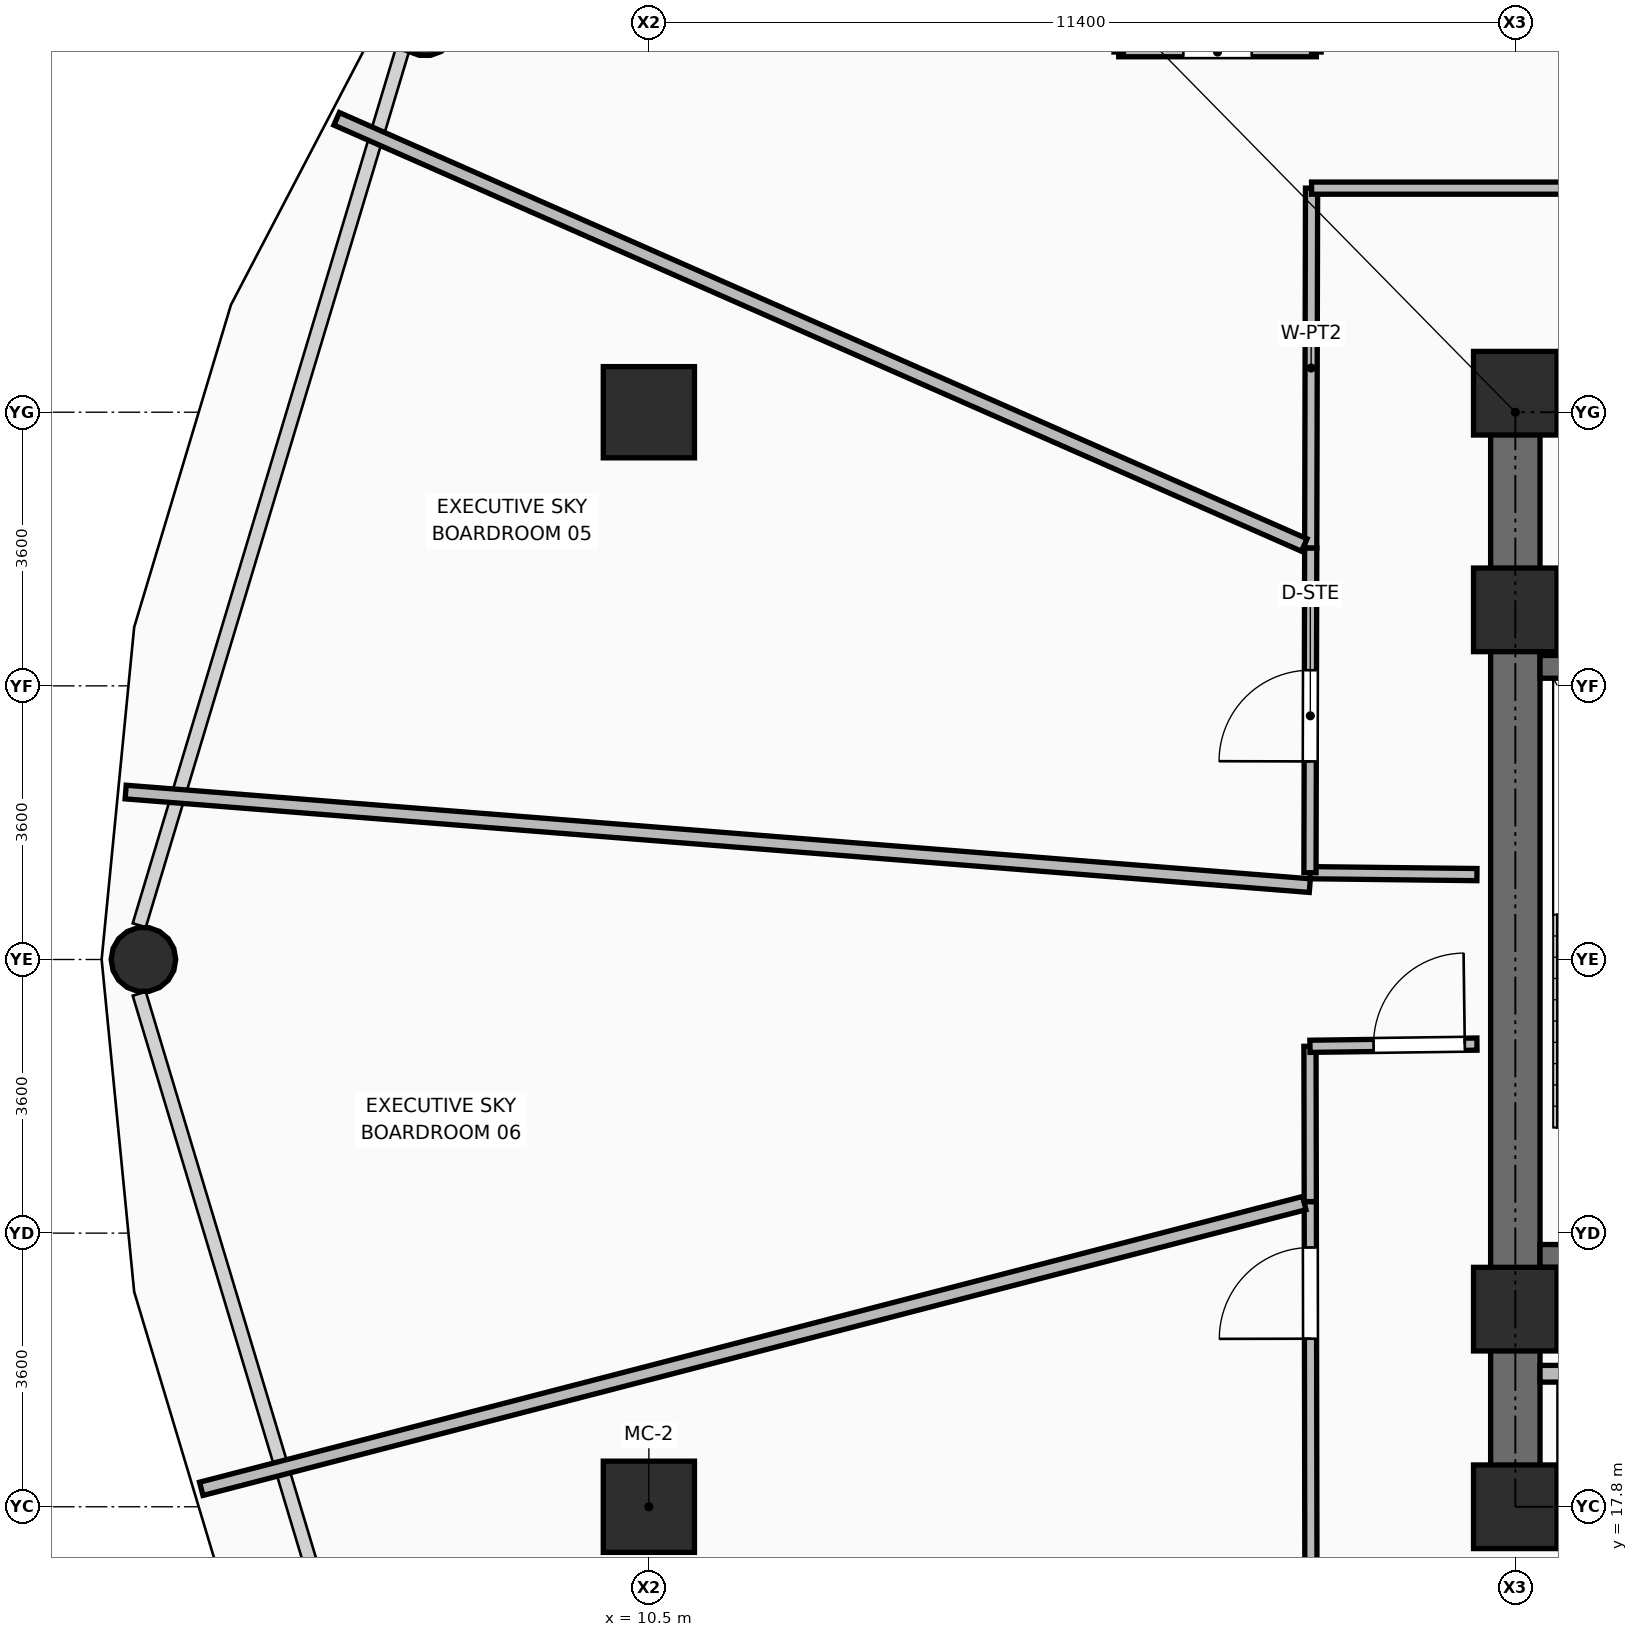
"""IFC4 building model, lengths in metres.
Left out: names, types, materials, properties, quantities, classifications, styles, units other than length and angle.
Written with IfcOpenShell. Run it as: python <this file> out.ifc"""

import sys

from ifc_helpers import new_model, si_unit, direction, frame, frame_2d, origin, origin_2d, place, context, subcontext, project, spatial, rectangle, hollow_rectangle, hollow_circle, extrude, element, fill, save


model = new_model("IFC4")
c1 = context("Model", 3, precision=1e-05, world=origin(), true_north=direction((0.0, 1.0)))
c2 = subcontext(c1, "Body", "Model", "MODEL_VIEW")
j1 = project(units=[si_unit("LENGTHUNIT", "METRE"), si_unit("PLANEANGLEUNIT", "RADIAN")], contexts=[c1])
p1 = place(None, origin())
s1 = spatial("IfcSite", under=j1, at=p1, CompositionType="ELEMENT")
p2 = place(p1, origin())
s2 = spatial("IfcBuilding", under=s1, at=p2, CompositionType="ELEMENT")
p3 = place(p2, frame((0.0, 0.0, 75.75)))
s3 = spatial("IfcBuildingStorey", under=s2, at=p3, CompositionType="ELEMENT", Elevation=75.75)
for number, where, z_axis, x_axis in (
    (1, (21.9, 17.8, 0.0), (0.0, 0.0, 1.0), (1.0, 0.0, 0.0)),
    (2, (21.9, 20.4, 0.0), (0.0, 0.0, 1.0), (1.0, 0.0, 0.0)),
    (3, (21.9, 29.6, 0.0), (0.0, 0.0, 1.0), (1.0, 0.0, 0.0)),
    (4, (21.9, 32.45, 0.0), (0.0, 0.0, 1.0), (1.0, 0.0, 0.0)),
):
    element("IfcColumn", number, at=place(p3, frame(where, z_axis=z_axis, x_axis=x_axis)), inside=s3, PredefinedType="COLUMN", context=c2, shape_type="SweptSolid", body=[
        extrude(rectangle(XDim=1.1, YDim=1.1, at=origin_2d()), origin(), (0.0, 0.0, 1.0), 3.75),
    ])
for number, where, z_axis, x_axis in (
    (5, (10.5, 17.8, 0.0), (0.0, 0.0, 1.0), (1.0, 0.0, 0.0)),
    (6, (10.5, 32.2, 0.0), (0.0, 0.0, 1.0), (1.0, 0.0, 0.0)),
):
    element("IfcColumn", number, at=place(p3, frame(where, z_axis=z_axis, x_axis=x_axis)), inside=s3, PredefinedType="COLUMN", context=c2, shape_type="SweptSolid", body=[
        extrude(hollow_rectangle(XDim=1.2, YDim=1.2, WallThickness=0.045, at=origin_2d()), origin(), (0.0, 0.0, 1.0), 3.75),
    ])
p4 = place(p3, frame((7.554, 37.314, 0.0), z_axis=(0.03641885619, -0.018721888548, 0.999161227132), x_axis=(0.457197196227, 0.889365348865, 0.0)))
e7 = element("IfcColumn", 7, at=p4, inside=s3, PredefinedType="COLUMN", context=c2, shape_type="SweptSolid", body=[
    extrude(hollow_circle(Radius=0.425, WallThickness=0.04, at=origin_2d()), origin(), (0.0, 0.0, 1.0), 3.573),
])
p5 = place(p3, frame((3.85, 25.0, 0.0), z_axis=(0.041951682921, 0.0, 0.999119640634), x_axis=(0.0, 1.0, 0.0)))
e8 = element("IfcColumn", 8, at=p5, inside=s3, PredefinedType="COLUMN", context=c2, shape_type="SweptSolid", body=[
    extrude(hollow_circle(Radius=0.425, WallThickness=0.04, at=origin_2d()), origin(), (0.0, 0.0, 1.0), 3.573),
])
p6 = place(p3, frame((21.575, 17.8, 0.0), z_axis=(0.0, 0.0, 1.0), x_axis=(1.0, 0.0, 0.0)))
e9 = element("IfcWall", 9, at=p6, inside=s3, PredefinedType="SHEAR", context=c2, shape_type="SweptSolid", body=[
    extrude(rectangle(XDim=2.175, YDim=0.65, at=frame_2d((1.087, 0.0))), origin(), (0.0, 0.0, 1.0), 3.57),
])
p7 = place(p3, frame((21.575, 32.45, 0.0), z_axis=(0.0, 0.0, 1.0), x_axis=(1.0, 0.0, 0.0)))
e10 = element("IfcWall", 10, at=p7, inside=s3, PredefinedType="SHEAR", context=c2, shape_type="SweptSolid", body=[
    extrude(rectangle(XDim=19.85, YDim=0.65, at=frame_2d((9.925, 0.0))), origin(), (0.0, 0.0, 1.0), 3.57),
])
p8 = place(p7, frame((2.175, 0.0, 0.0)))
e11 = element("IfcOpeningElement", 11, at=p8, cuts=e10, PredefinedType="OPENING", context=c2, shape_type="SweptSolid", body=[
    extrude(rectangle(XDim=1.1, YDim=2.1, at=frame_2d((0.55, 1.05))), frame((0.0, 0.335, 0.0), z_axis=(0.0, -1.0, 0.0), x_axis=(1.0, 0.0, 0.0)), (0.0, 0.0, 1.0), 0.67),
])
p9 = place(p7, frame((15.565, 0.0, 0.0)))
e12 = element("IfcOpeningElement", 12, at=p9, cuts=e10, PredefinedType="OPENING", context=c2, shape_type="SweptSolid", body=[
    extrude(rectangle(XDim=1.0, YDim=2.1, at=frame_2d((0.5, 1.05))), frame((0.0, 0.335, 0.0), z_axis=(0.0, -1.0, 0.0), x_axis=(1.0, 0.0, 0.0)), (0.0, 0.0, 1.0), 0.67),
])
p10 = place(p7, frame((17.575, 0.0, 0.0)))
e13 = element("IfcOpeningElement", 13, at=p10, cuts=e10, PredefinedType="OPENING", context=c2, shape_type="SweptSolid", body=[
    extrude(rectangle(XDim=0.9, YDim=2.1, at=frame_2d((0.45, 1.05))), frame((0.0, 0.335, 0.0), z_axis=(0.0, -1.0, 0.0), x_axis=(1.0, 0.0, 0.0)), (0.0, 0.0, 1.0), 0.67),
])
p11 = place(p3, frame((21.9, 18.125, 0.0), z_axis=(0.0, 0.0, 1.0), x_axis=(0.0, 1.0, 0.0)))
e14 = element("IfcWall", 14, at=p11, inside=s3, PredefinedType="SHEAR", context=c2, shape_type="SweptSolid", body=[
    extrude(rectangle(XDim=14.0, YDim=0.65, at=frame_2d((7.0, 0.0))), origin(), (0.0, 0.0, 1.0), 3.57),
])
p12 = place(p3, frame((22.225, 21.1, 0.0), z_axis=(0.0, 0.0, 1.0), x_axis=(1.0, 0.0, 0.0)))
e15 = element("IfcWall", 15, at=p12, inside=s3, PredefinedType="SHEAR", context=c2, shape_type="SweptSolid", body=[
    extrude(rectangle(XDim=3.515, YDim=0.3, at=frame_2d((1.757, 0.0))), origin(), (0.0, 0.0, 1.0), 3.57),
])
p13 = place(p12, frame((1.995, 0.0, 0.0)))
e16 = element("IfcOpeningElement", 16, at=p13, cuts=e15, PredefinedType="OPENING", context=c2, shape_type="SweptSolid", body=[
    extrude(rectangle(XDim=1.05, YDim=2.1, at=frame_2d((0.525, 1.05))), frame((0.0, 0.16, 0.0), z_axis=(0.0, -1.0, 0.0), x_axis=(1.0, 0.0, 0.0)), (0.0, 0.0, 1.0), 0.32),
])
p14 = place(p3, frame((22.225, 28.85, 0.0), z_axis=(0.0, 0.0, 1.0), x_axis=(1.0, 0.0, 0.0)))
e17 = element("IfcWall", 17, at=p14, inside=s3, PredefinedType="SHEAR", context=c2, shape_type="SweptSolid", body=[
    extrude(rectangle(XDim=3.515, YDim=0.3, at=frame_2d((1.757, 0.0))), origin(), (0.0, 0.0, 1.0), 3.57),
])
p15 = place(p3, frame((22.225, 19.55, 0.0), z_axis=(0.0, 0.0, 1.0), x_axis=(1.0, 0.0, 0.0)))
e18 = element("IfcWall", 18, at=p15, inside=s3, PredefinedType="PARTITIONING", context=c2, shape_type="SweptSolid", body=[
    extrude(rectangle(XDim=1.565, YDim=0.22, at=frame_2d((0.782, 0.0))), origin(), (0.0, 0.0, 1.0), 2.595),
])
p16 = place(p3, frame((21.395, 26.117, 0.0), z_axis=(0.0, 0.0, 1.0), x_axis=(-0.999934504226, 0.011444966545, 0.0)))
e19 = element("IfcWall", 19, at=p16, inside=s3, PredefinedType="PARTITIONING", context=c2, shape_type="SweptSolid", body=[
    extrude(rectangle(XDim=2.197, YDim=0.16, at=frame_2d((1.099, 0.0))), origin(), (0.0, 0.0, 1.0), 3.55),
])
p17 = place(p3, frame((19.198, 26.142, 0.0), z_axis=(0.0, 0.0, 1.0), x_axis=(0.002342582991, 0.999997256149, 0.0)))
e20 = element("IfcWall", 20, at=p17, inside=s3, PredefinedType="PARTITIONING", context=c2, shape_type="SweptSolid", body=[
    extrude(rectangle(XDim=4.273, YDim=0.16, at=frame_2d((2.136, 0.0))), origin(), (0.0, 0.0, 1.0), 3.55),
])
p18 = place(p17, frame((1.464, 0.0, 0.0)))
e21 = element("IfcOpeningElement", 21, at=p18, cuts=e20, PredefinedType="OPENING", context=c2, shape_type="SweptSolid", body=[
    extrude(rectangle(XDim=1.2, YDim=2.1, at=frame_2d((0.6, 1.05))), frame((0.0, 0.09, 0.0), z_axis=(0.0, -1.0, 0.0), x_axis=(1.0, 0.0, 0.0)), (0.0, 0.0, 1.0), 0.18),
])
p19 = place(p3, frame((19.208, 30.415, 0.0), z_axis=(0.0, 0.0, 1.0), x_axis=(0.002321256513, 0.99999730588, 0.0)))
e22 = element("IfcWall", 22, at=p19, inside=s3, PredefinedType="PARTITIONING", context=c2, shape_type="SweptSolid", body=[
    extrude(rectangle(XDim=4.733, YDim=0.16, at=frame_2d((2.366, 0.0))), origin(), (0.0, 0.0, 1.0), 2.928),
])
p20 = place(p3, frame((19.219, 35.148, 0.0), z_axis=(0.0, 0.0, 1.0), x_axis=(1.0, 0.0, 0.0)))
e23 = element("IfcWall", 23, at=p20, inside=s3, PredefinedType="PARTITIONING", context=c2, shape_type="SweptSolid", body=[
    extrude(rectangle(XDim=7.741, YDim=0.16, at=frame_2d((3.871, 0.0))), origin(), (0.0, 0.0, 1.0), 2.928),
])
p21 = place(p20, frame((4.307, 0.0, 0.0)))
e24 = element("IfcOpeningElement", 24, at=p21, cuts=e23, PredefinedType="OPENING", context=c2, shape_type="SweptSolid", body=[
    extrude(rectangle(XDim=1.2, YDim=2.1, at=frame_2d((0.6, 1.05))), frame((0.0, 0.09, 0.0), z_axis=(0.0, -1.0, 0.0), x_axis=(1.0, 0.0, 0.0)), (0.0, 0.0, 1.0), 0.18),
])
p22 = place(p3, frame((19.219, 11.867, 0.0), z_axis=(0.0, 0.0, 1.0), x_axis=(-0.001717915349, 0.999998524382, 0.0)))
e25 = element("IfcWall", 25, at=p22, inside=s3, PredefinedType="PARTITIONING", context=c2, shape_type="SweptSolid", body=[
    extrude(rectangle(XDim=9.948, YDim=0.16, at=frame_2d((4.974, 0.0))), origin(), (0.0, 0.0, 1.0), 2.928),
])
p23 = place(p22, frame((8.144, 0.0, 0.0)))
e26 = element("IfcOpeningElement", 26, at=p23, cuts=e25, PredefinedType="OPENING", context=c2, shape_type="SweptSolid", body=[
    extrude(rectangle(XDim=1.2, YDim=2.1, at=frame_2d((0.6, 1.05))), frame((0.0, 0.09, 0.0), z_axis=(0.0, -1.0, 0.0), x_axis=(1.0, 0.0, 0.0)), (0.0, 0.0, 1.0), 0.18),
])
p24 = place(p3, frame((19.202, 21.815, 0.0), z_axis=(0.0, 0.0, 1.0), x_axis=(-0.001912042394, 0.999998172045, 0.0)))
e27 = element("IfcWall", 27, at=p24, inside=s3, PredefinedType="PARTITIONING", context=c2, shape_type="SweptSolid", body=[
    extrude(rectangle(XDim=2.043, YDim=0.16, at=frame_2d((1.021, 0.0))), origin(), (0.0, 0.0, 1.0), 3.55),
])
p25 = place(p3, frame((19.198, 23.858, 0.0), z_axis=(0.0, 0.0, 1.0), x_axis=(0.999912578456, 0.013222535486, 0.0)))
e28 = element("IfcWall", 28, at=p25, inside=s3, PredefinedType="PARTITIONING", context=c2, shape_type="SweptSolid", body=[
    extrude(rectangle(XDim=2.197, YDim=0.16, at=frame_2d((1.099, 0.0))), origin(), (0.0, 0.0, 1.0), 3.55),
])
p26 = place(p25, frame((0.837, 0.0, 0.0)))
e29 = element("IfcOpeningElement", 29, at=p26, cuts=e28, PredefinedType="OPENING", context=c2, shape_type="SweptSolid", body=[
    extrude(rectangle(XDim=1.2, YDim=2.1, at=frame_2d((0.6, 1.05))), frame((0.0, 0.09, 0.0), z_axis=(0.0, -1.0, 0.0), x_axis=(1.0, 0.0, 0.0)), (0.0, 0.0, 1.0), 0.18),
])
p27 = place(p3, frame((26.925, 35.228, 0.0), z_axis=(0.0, 0.0, 1.0), x_axis=(-0.4083604268, 0.912820772016, 0.0)))
e30 = element("IfcWall", 30, at=p27, inside=s3, PredefinedType="PARTITIONING", context=c2, shape_type="SweptSolid", body=[
    extrude(rectangle(XDim=14.255, YDim=0.18, at=frame_2d((7.127, 0.0))), origin(), (0.0, 0.0, 1.0), 2.775),
])
p28 = place(p3, frame((19.123, 30.453, 0.0), z_axis=(0.0, 0.0, 1.0), x_axis=(-0.915167724462, 0.403073239131, 0.0)))
e31 = element("IfcWall", 31, at=p28, inside=s3, PredefinedType="PARTITIONING", context=c2, shape_type="SweptSolid", body=[
    extrude(rectangle(XDim=13.911, YDim=0.18, at=frame_2d((6.956, 0.0))), origin(), (0.0, 0.0, 1.0), 2.775),
])
p29 = place(p3, frame((19.196, 25.972, 0.0), z_axis=(0.0, 0.0, 1.0), x_axis=(-0.996893373325, 0.078762949547, 0.0)))
e32 = element("IfcWall", 32, at=p29, inside=s3, PredefinedType="PARTITIONING", context=c2, shape_type="SweptSolid", body=[
    extrude(rectangle(XDim=15.629, YDim=0.18, at=frame_2d((7.814, 0.0))), origin(), (0.0, 0.0, 1.0), 2.775),
])
p30 = place(p3, frame((19.123, 21.795, 0.0), z_axis=(0.0, 0.0, 1.0), x_axis=(-0.968050799349, -0.250754162238, 0.0)))
e33 = element("IfcWall", 33, at=p30, inside=s3, PredefinedType="PARTITIONING", context=c2, shape_type="SweptSolid", body=[
    extrude(rectangle(XDim=14.991, YDim=0.18, at=frame_2d((7.496, 0.0))), origin(), (0.0, 0.0, 1.0), 2.775),
])
p31 = place(p3, frame((16.682, 36.939, 0.0), z_axis=(0.0, 0.0, 1.0), x_axis=(1.0, 0.0, 0.0)))
e34 = element("IfcWall", 34, at=p31, inside=s3, PredefinedType="PARTITIONING", context=c2, shape_type="SweptSolid", body=[
    extrude(rectangle(XDim=2.6, YDim=0.125, at=frame_2d((1.3, 0.0))), origin(), (0.0, 0.0, 1.0), 3.55),
])
p32 = place(p31, frame((0.85, 0.0, 0.0)))
e35 = element("IfcOpeningElement", 35, at=p32, cuts=e34, PredefinedType="OPENING", context=c2, shape_type="SweptSolid", body=[
    extrude(rectangle(XDim=0.9, YDim=2.1, at=frame_2d((0.45, 1.05))), frame((0.0, 0.073, 0.0), z_axis=(0.0, -1.0, 0.0), x_axis=(1.0, 0.0, 0.0)), (0.0, 0.0, 1.0), 0.145),
])
p33 = place(p32, origin())
e36 = element("IfcDoor", 36, at=p33, inside=s3, OperationType="SINGLE_SWING_LEFT", PredefinedType="DOOR", context=c2, shape_type="SweptSolid", body=[
    extrude(rectangle(XDim=0.9, YDim=2.1, at=frame_2d((0.45, 1.05))), frame((0.0, 0.025, 0.0), z_axis=(0.0, -1.0, 0.0), x_axis=(1.0, 0.0, 0.0)), (0.0, 0.0, 1.0), 0.05),
])
fill(e35, e36)
p34 = place(p18, origin())
e37 = element("IfcDoor", 37, at=p34, inside=s3, OperationType="SINGLE_SWING_LEFT", PredefinedType="DOOR", context=c2, shape_type="SweptSolid", body=[
    extrude(rectangle(XDim=1.2, YDim=2.1, at=frame_2d((0.6, 1.05))), frame((0.0, 0.025, 0.0), z_axis=(0.0, -1.0, 0.0), x_axis=(1.0, 0.0, 0.0)), (0.0, 0.0, 1.0), 0.05),
])
fill(e21, e37)
p35 = place(p26, origin())
e38 = element("IfcDoor", 38, at=p35, inside=s3, OperationType="SINGLE_SWING_RIGHT", PredefinedType="DOOR", context=c2, shape_type="SweptSolid", body=[
    extrude(rectangle(XDim=1.2, YDim=2.1, at=frame_2d((0.6, 1.05))), frame((0.0, 0.025, 0.0), z_axis=(0.0, -1.0, 0.0), x_axis=(1.0, 0.0, 0.0)), (0.0, 0.0, 1.0), 0.05),
])
fill(e29, e38)
p36 = place(p23, origin())
e39 = element("IfcDoor", 39, at=p36, inside=s3, OperationType="SINGLE_SWING_LEFT", PredefinedType="DOOR", context=c2, shape_type="SweptSolid", body=[
    extrude(rectangle(XDim=1.2, YDim=2.1, at=frame_2d((0.6, 1.05))), frame((0.0, 0.025, 0.0), z_axis=(0.0, -1.0, 0.0), x_axis=(1.0, 0.0, 0.0)), (0.0, 0.0, 1.0), 0.05),
])
fill(e26, e39)
save(model, sys.argv[1])
